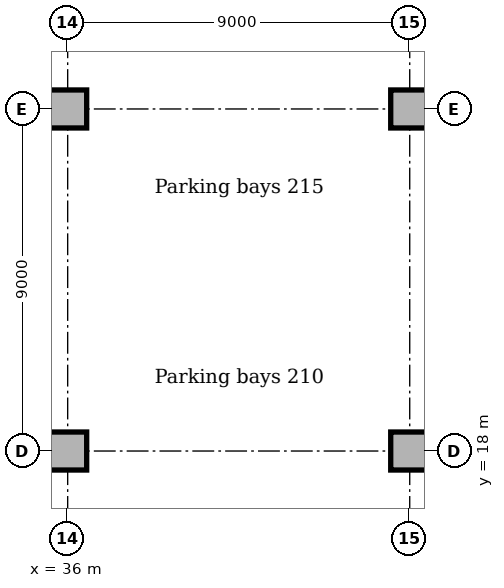
"""IFC4 building model, lengths in metres.
Left out: names, types, materials, properties, quantities, classifications, styles, units other than length and angle.
Written with IfcOpenShell. Run it as: python <this file> out.ifc"""

import sys

from ifc_helpers import new_model, si_unit, direction, frame, origin, origin_2d, place, context, subcontext, project, spatial, rectangle, extrude, element, save


model = new_model("IFC4")
c1 = context("Model", 3, precision=1e-05, world=origin(), true_north=direction((0.0, 1.0)))
c2 = subcontext(c1, "Body", "Model", "MODEL_VIEW")
j1 = project(units=[si_unit("LENGTHUNIT", "METRE"), si_unit("PLANEANGLEUNIT", "RADIAN")], contexts=[c1])
p1 = place(None, origin())
s1 = spatial("IfcSite", under=j1, at=p1, CompositionType="ELEMENT")
p2 = place(p1, origin())
s2 = spatial("IfcBuilding", under=s1, at=p2, CompositionType="ELEMENT")
p3 = place(p2, frame((0.0, 0.0, -9.5)))
s3 = spatial("IfcBuildingStorey", under=s2, at=p3, CompositionType="ELEMENT", Elevation=-9.5)
for number, where, z_axis, x_axis in (
    (1, (36.0, 18.0, 0.0), (0.0, 0.0, 1.0), (1.0, 0.0, 0.0)),
    (2, (36.0, 27.0, 0.0), (0.0, 0.0, 1.0), (1.0, 0.0, 0.0)),
    (3, (45.0, 18.0, 0.0), (0.0, 0.0, 1.0), (1.0, 0.0, 0.0)),
    (4, (45.0, 27.0, 0.0), (0.0, 0.0, 1.0), (1.0, 0.0, 0.0)),
):
    element("IfcColumn", number, at=place(p3, frame(where, z_axis=z_axis, x_axis=x_axis)), inside=s3, PredefinedType="COLUMN", context=c2, shape_type="SweptSolid", body=[
        extrude(rectangle(XDim=1.0, YDim=1.0, at=origin_2d()), origin(), (0.0, 0.0, 1.0), 4.15),
    ])
save(model, sys.argv[1])
